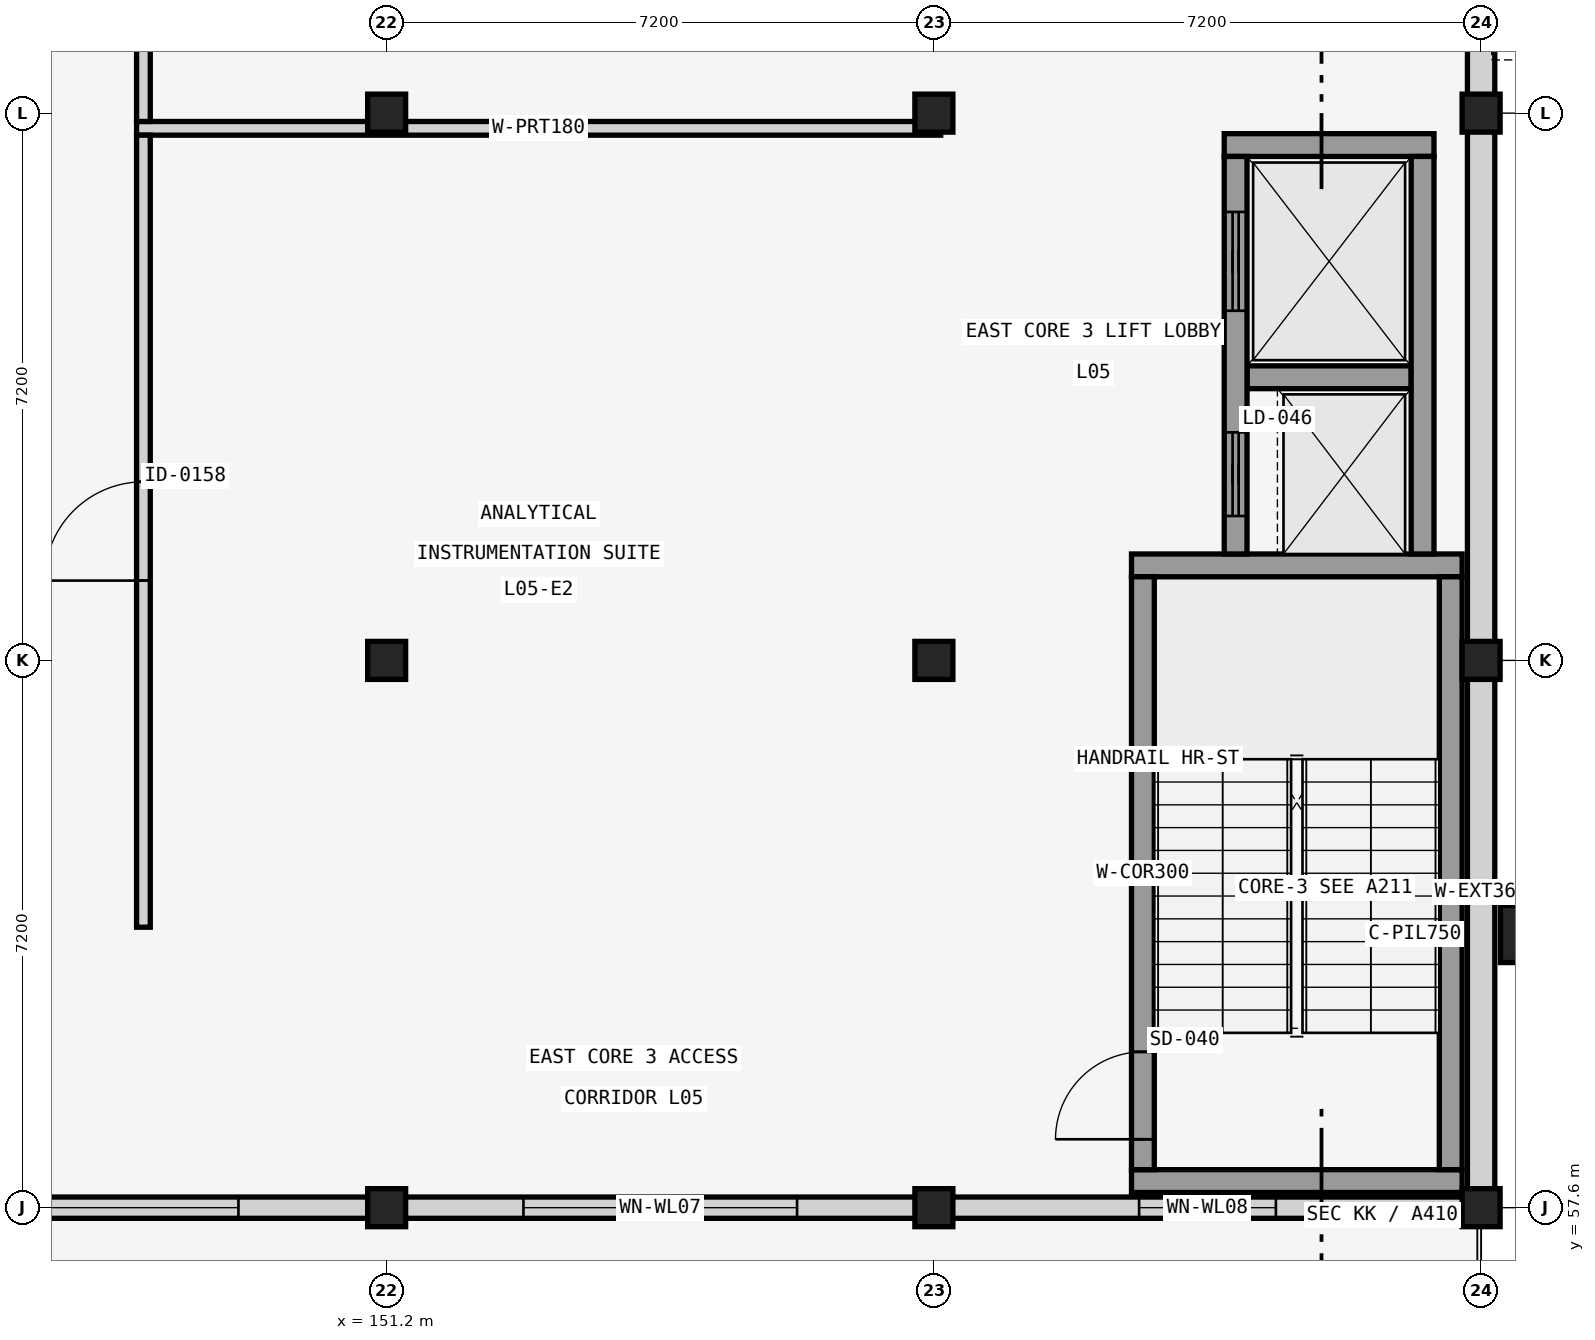
"""IFC4 building model, lengths in metres.
Left out: names, types, materials, properties, quantities, classifications, styles, units other than length and angle.
Written with IfcOpenShell. Run it as: python <this file> out.ifc"""

import sys

from ifc_helpers import new_model, si_unit, direction, frame, frame_2d, origin, origin_2d, place, context, subcontext, project, spatial, rectangle, extrude, element, fill, save


model = new_model("IFC4")
c1 = context("Model", 3, precision=1e-05, world=origin(), true_north=direction((0.0, 1.0)))
c2 = subcontext(c1, "Body", "Model", "MODEL_VIEW")
j1 = project(units=[si_unit("LENGTHUNIT", "METRE"), si_unit("PLANEANGLEUNIT", "RADIAN")], contexts=[c1])
p1 = place(None, origin())
s1 = spatial("IfcSite", under=j1, at=p1, CompositionType="ELEMENT")
p2 = place(p1, origin())
s2 = spatial("IfcBuilding", under=s1, at=p2, CompositionType="ELEMENT")
p3 = place(p2, frame((0.0, 0.0, 21.44)))
s3 = spatial("IfcBuildingStorey", under=s2, at=p3, CompositionType="ELEMENT", Elevation=21.44)
for number, where, z_axis, x_axis in (
    (1, (151.2, 57.6, 0.0), (0.0, 0.0, 1.0), (1.0, 0.0, 0.0)),
    (2, (151.2, 64.8, 0.0), (0.0, 0.0, 1.0), (1.0, 0.0, 0.0)),
    (3, (151.2, 72.0, 0.0), (0.0, 0.0, 1.0), (1.0, 0.0, 0.0)),
    (4, (158.4, 57.6, 0.0), (0.0, 0.0, 1.0), (1.0, 0.0, 0.0)),
    (5, (158.4, 64.8, 0.0), (0.0, 0.0, 1.0), (1.0, 0.0, 0.0)),
    (6, (158.4, 72.0, 0.0), (0.0, 0.0, 1.0), (1.0, 0.0, 0.0)),
    (7, (165.6, 57.6, 0.0), (0.0, 0.0, 1.0), (1.0, 0.0, 0.0)),
    (8, (165.6, 64.8, 0.0), (0.0, 0.0, 1.0), (1.0, 0.0, 0.0)),
    (9, (165.6, 72.0, 0.0), (0.0, 0.0, 1.0), (1.0, 0.0, 0.0)),
):
    element("IfcColumn", number, at=place(p3, frame(where, z_axis=z_axis, x_axis=x_axis)), inside=s3, PredefinedType="COLUMN", context=c2, shape_type="SweptSolid", body=[
        extrude(rectangle(XDim=0.5, YDim=0.5, at=origin_2d()), origin(), (0.0, 0.0, 1.0), 4.16),
    ])
p4 = place(p3, frame((166.08, 61.2, 0.0), z_axis=(0.0, 0.0, 1.0), x_axis=(1.0, 0.0, 0.0)))
e10 = element("IfcColumn", 10, at=p4, inside=s3, PredefinedType="PILASTER", context=c2, shape_type="SweptSolid", body=[
    extrude(rectangle(XDim=0.45, YDim=0.75, at=origin_2d()), origin(), (0.0, 0.0, 1.0), 4.16),
])
p5 = place(p3, frame((165.6, 57.84, 0.0), z_axis=(0.0, 0.0, 1.0), x_axis=(0.0, 1.0, 0.0)))
e11 = element("IfcWall", 11, at=p5, inside=s3, PredefinedType="SOLIDWALL", context=c2, shape_type="SweptSolid", body=[
    extrude(rectangle(XDim=6.72, YDim=0.36, at=frame_2d((3.36, 0.0))), origin(), (0.0, 0.0, 1.0), 3.21),
])
p6 = place(p3, frame((165.6, 65.04, 0.0), z_axis=(0.0, 0.0, 1.0), x_axis=(0.0, 1.0, 0.0)))
e12 = element("IfcWall", 12, at=p6, inside=s3, PredefinedType="SOLIDWALL", context=c2, shape_type="SweptSolid", body=[
    extrude(rectangle(XDim=6.72, YDim=0.36, at=frame_2d((3.36, 0.0))), origin(), (0.0, 0.0, 1.0), 3.16),
])
p7 = place(p3, frame((165.6, 72.24, 0.0), z_axis=(0.0, 0.0, 1.0), x_axis=(0.0, 1.0, 0.0)))
e13 = element("IfcWall", 13, at=p7, inside=s3, PredefinedType="SOLIDWALL", context=c2, shape_type="SweptSolid", body=[
    extrude(rectangle(XDim=6.72, YDim=0.36, at=frame_2d((3.36, 0.0))), origin(), (0.0, 0.0, 1.0), 3.16),
])
p8 = place(p7, frame((1.71, 0.0, 0.9)))
e14 = element("IfcOpeningElement", 14, at=p8, cuts=e13, PredefinedType="OPENING", context=c2, shape_type="SweptSolid", body=[
    extrude(rectangle(XDim=3.3, YDim=2.1, at=frame_2d((1.65, 1.05))), frame((0.0, 0.19, 0.0), z_axis=(0.0, -1.0, 0.0), x_axis=(1.0, 0.0, 0.0)), (0.0, 0.0, 1.0), 0.38),
])
p9 = place(p3, frame((144.24, 57.6, 0.0), z_axis=(0.0, 0.0, 1.0), x_axis=(1.0, 0.0, 0.0)))
e15 = element("IfcWall", 15, at=p9, inside=s3, PredefinedType="SOLIDWALL", context=c2, shape_type="SweptSolid", body=[
    extrude(rectangle(XDim=6.72, YDim=0.28, at=frame_2d((3.36, 0.0))), origin(), (0.0, 0.0, 1.0), 3.21),
])
p10 = place(p9, frame((1.71, 0.0, 0.95)))
e16 = element("IfcOpeningElement", 16, at=p10, cuts=e15, PredefinedType="OPENING", context=c2, shape_type="SweptSolid", body=[
    extrude(rectangle(XDim=3.3, YDim=2.1, at=frame_2d((1.65, 1.05))), frame((0.0, 0.15, 0.0), z_axis=(0.0, -1.0, 0.0), x_axis=(1.0, 0.0, 0.0)), (0.0, 0.0, 1.0), 0.3),
])
p11 = place(p3, frame((151.44, 57.6, 0.0), z_axis=(0.0, 0.0, 1.0), x_axis=(1.0, 0.0, 0.0)))
e17 = element("IfcWall", 17, at=p11, inside=s3, PredefinedType="SOLIDWALL", context=c2, shape_type="SweptSolid", body=[
    extrude(rectangle(XDim=6.72, YDim=0.28, at=frame_2d((3.36, 0.0))), origin(), (0.0, 0.0, 1.0), 3.21),
])
p12 = place(p11, frame((1.56, 0.0, 0.95)))
e18 = element("IfcOpeningElement", 18, at=p12, cuts=e17, PredefinedType="OPENING", context=c2, shape_type="SweptSolid", body=[
    extrude(rectangle(XDim=3.6, YDim=2.1, at=frame_2d((1.8, 1.05))), frame((0.0, 0.15, 0.0), z_axis=(0.0, -1.0, 0.0), x_axis=(1.0, 0.0, 0.0)), (0.0, 0.0, 1.0), 0.3),
])
p13 = place(p3, frame((158.64, 57.6, 0.0), z_axis=(0.0, 0.0, 1.0), x_axis=(1.0, 0.0, 0.0)))
e19 = element("IfcWall", 19, at=p13, inside=s3, PredefinedType="SOLIDWALL", context=c2, shape_type="SweptSolid", body=[
    extrude(rectangle(XDim=6.72, YDim=0.28, at=frame_2d((3.36, 0.0))), origin(), (0.0, 0.0, 1.0), 3.21),
])
p14 = place(p13, frame((2.46, 0.0, 0.95)))
e20 = element("IfcOpeningElement", 20, at=p14, cuts=e19, PredefinedType="OPENING", context=c2, shape_type="SweptSolid", body=[
    extrude(rectangle(XDim=1.8, YDim=1.8, at=frame_2d((0.9, 0.9))), frame((0.0, 0.15, 0.0), z_axis=(0.0, -1.0, 0.0), x_axis=(1.0, 0.0, 0.0)), (0.0, 0.0, 1.0), 0.3),
])
for number, where, z_axis, x_axis in (
    (21, (161.0, 57.95, 0.0), (0.0, 0.0, 1.0), (1.0, 0.0, 0.0)),
    (22, (161.0, 66.05, 0.0), (0.0, 0.0, 1.0), (1.0, 0.0, 0.0)),
):
    element("IfcWall", number, at=place(p3, frame(where, z_axis=z_axis, x_axis=x_axis)), inside=s3, PredefinedType="SHEAR", context=c2, shape_type="SweptSolid", body=[
        extrude(rectangle(XDim=4.35, YDim=0.3, at=frame_2d((2.175, 0.0))), origin(), (0.0, 0.0, 1.0), 3.81),
    ])
p15 = place(p3, frame((161.15, 58.1, 0.0), z_axis=(0.0, 0.0, 1.0), x_axis=(0.0, 1.0, 0.0)))
e23 = element("IfcWall", 23, at=p15, inside=s3, PredefinedType="SHEAR", context=c2, shape_type="SweptSolid", body=[
    extrude(rectangle(XDim=7.8, YDim=0.3, at=frame_2d((3.9, 0.0))), origin(), (0.0, 0.0, 1.0), 3.81),
])
p16 = place(p15, frame((0.4, 0.0, 0.0)))
e24 = element("IfcOpeningElement", 24, at=p16, cuts=e23, PredefinedType="OPENING", context=c2, shape_type="SweptSolid", body=[
    extrude(rectangle(XDim=1.15, YDim=2.2, at=frame_2d((0.575, 1.1))), frame((0.0, 0.16, 0.0), z_axis=(0.0, -1.0, 0.0), x_axis=(1.0, 0.0, 0.0)), (0.0, 0.0, 1.0), 0.32),
])
p17 = place(p3, frame((165.2, 58.1, 0.0), z_axis=(0.0, 0.0, 1.0), x_axis=(0.0, 1.0, 0.0)))
e25 = element("IfcWall", 25, at=p17, inside=s3, PredefinedType="SHEAR", context=c2, shape_type="SweptSolid", body=[
    extrude(rectangle(XDim=7.8, YDim=0.3, at=frame_2d((3.9, 0.0))), origin(), (0.0, 0.0, 1.0), 3.81),
])
p18 = place(p3, frame((162.22, 71.58, 0.0), z_axis=(0.0, 0.0, 1.0), x_axis=(1.0, 0.0, 0.0)))
e26 = element("IfcWall", 26, at=p18, inside=s3, PredefinedType="SHEAR", context=c2, shape_type="SweptSolid", body=[
    extrude(rectangle(XDim=2.76, YDim=0.3, at=frame_2d((1.38, 0.0))), origin(), (0.0, 0.0, 1.0), 3.81),
])
p19 = place(p3, frame((162.52, 68.525, 0.0), z_axis=(0.0, 0.0, 1.0), x_axis=(1.0, 0.0, 0.0)))
e27 = element("IfcWall", 27, at=p19, inside=s3, PredefinedType="SHEAR", context=c2, shape_type="SweptSolid", body=[
    extrude(rectangle(XDim=2.16, YDim=0.3, at=frame_2d((1.08, 0.0))), origin(), (0.0, 0.0, 1.0), 3.81),
])
p20 = place(p3, frame((162.37, 66.2, 0.0), z_axis=(0.0, 0.0, 1.0), x_axis=(0.0, 1.0, 0.0)))
e28 = element("IfcWall", 28, at=p20, inside=s3, PredefinedType="SHEAR", context=c2, shape_type="SweptSolid", body=[
    extrude(rectangle(XDim=5.23, YDim=0.3, at=frame_2d((2.615, 0.0))), origin(), (0.0, 0.0, 1.0), 3.81),
])
p21 = place(p20, frame((0.5, 0.0, 0.0)))
e29 = element("IfcOpeningElement", 29, at=p21, cuts=e28, PredefinedType="OPENING", context=c2, shape_type="SweptSolid", body=[
    extrude(rectangle(XDim=1.1, YDim=2.2, at=frame_2d((0.55, 1.1))), frame((0.0, 0.16, 0.0), z_axis=(0.0, -1.0, 0.0), x_axis=(1.0, 0.0, 0.0)), (0.0, 0.0, 1.0), 0.32),
])
p22 = place(p20, frame((3.2, 0.0, 0.0)))
e30 = element("IfcOpeningElement", 30, at=p22, cuts=e28, PredefinedType="OPENING", context=c2, shape_type="SweptSolid", body=[
    extrude(rectangle(XDim=1.3, YDim=2.2, at=frame_2d((0.65, 1.1))), frame((0.0, 0.16, 0.0), z_axis=(0.0, -1.0, 0.0), x_axis=(1.0, 0.0, 0.0)), (0.0, 0.0, 1.0), 0.32),
])
p23 = place(p3, frame((164.83, 66.2, 0.0), z_axis=(0.0, 0.0, 1.0), x_axis=(0.0, 1.0, 0.0)))
e31 = element("IfcWall", 31, at=p23, inside=s3, PredefinedType="SHEAR", context=c2, shape_type="SweptSolid", body=[
    extrude(rectangle(XDim=5.23, YDim=0.3, at=frame_2d((2.615, 0.0))), origin(), (0.0, 0.0, 1.0), 3.81),
])
p24 = place(p3, frame((147.91, 71.8, 0.0), z_axis=(0.0, 0.0, 1.0), x_axis=(1.0, 0.0, 0.0)))
e32 = element("IfcWall", 32, at=p24, inside=s3, PredefinedType="PARTITIONING", context=c2, shape_type="SweptSolid", body=[
    extrude(rectangle(XDim=10.58, YDim=0.18, at=frame_2d((5.29, 0.0))), origin(), (0.0, 0.0, 1.0), 3.16),
])
p25 = place(p3, frame((148.0, 61.29, 0.0), z_axis=(0.0, 0.0, 1.0), x_axis=(0.0, 1.0, 0.0)))
e33 = element("IfcWall", 33, at=p25, inside=s3, PredefinedType="PARTITIONING", context=c2, shape_type="SweptSolid", body=[
    extrude(rectangle(XDim=10.42, YDim=0.18, at=frame_2d((5.21, 0.0))), origin(), (0.0, 0.0, 1.0), 3.16),
])
p26 = place(p25, frame((4.56, 0.0, 0.0)))
e34 = element("IfcOpeningElement", 34, at=p26, cuts=e33, PredefinedType="OPENING", context=c2, shape_type="SweptSolid", body=[
    extrude(rectangle(XDim=1.3, YDim=2.15, at=frame_2d((0.65, 1.075))), frame((0.0, 0.1, 0.0), z_axis=(0.0, -1.0, 0.0), x_axis=(1.0, 0.0, 0.0)), (0.0, 0.0, 1.0), 0.2),
])
p27 = place(p3, frame((148.0, 71.89, 0.0), z_axis=(0.0, 0.0, 1.0), x_axis=(0.0, 1.0, 0.0)))
e35 = element("IfcWall", 35, at=p27, inside=s3, PredefinedType="PARTITIONING", context=c2, shape_type="SweptSolid", body=[
    extrude(rectangle(XDim=28.82, YDim=0.18, at=frame_2d((14.41, 0.0))), origin(), (0.0, 0.0, 1.0), 3.16),
])
p28 = place(p27, frame((13.685, 0.0, 0.0)))
e36 = element("IfcOpeningElement", 36, at=p28, cuts=e35, PredefinedType="OPENING", context=c2, shape_type="SweptSolid", body=[
    extrude(rectangle(XDim=1.45, YDim=2.2, at=frame_2d((0.725, 1.1))), frame((0.0, 0.1, 0.0), z_axis=(0.0, -1.0, 0.0), x_axis=(1.0, 0.0, 0.0)), (0.0, 0.0, 1.0), 0.2),
])
p29 = place(p10, origin())
e37 = element("IfcWindow", 37, at=p29, inside=s3, PartitioningType="SINGLE_PANEL", PredefinedType="WINDOW", context=c2, shape_type="SweptSolid", body=[
    extrude(rectangle(XDim=3.3, YDim=2.1, at=frame_2d((1.65, 1.05))), frame((0.0, 0.03, 0.0), z_axis=(0.0, -1.0, 0.0), x_axis=(1.0, 0.0, 0.0)), (0.0, 0.0, 1.0), 0.06),
])
fill(e16, e37)
p30 = place(p12, origin())
e38 = element("IfcWindow", 38, at=p30, inside=s3, PartitioningType="SINGLE_PANEL", PredefinedType="WINDOW", context=c2, shape_type="SweptSolid", body=[
    extrude(rectangle(XDim=3.6, YDim=2.1, at=frame_2d((1.8, 1.05))), frame((0.0, 0.03, 0.0), z_axis=(0.0, -1.0, 0.0), x_axis=(1.0, 0.0, 0.0)), (0.0, 0.0, 1.0), 0.06),
])
fill(e18, e38)
p31 = place(p14, origin())
e39 = element("IfcWindow", 39, at=p31, inside=s3, PartitioningType="SINGLE_PANEL", PredefinedType="WINDOW", context=c2, shape_type="SweptSolid", body=[
    extrude(rectangle(XDim=1.8, YDim=1.8, at=frame_2d((0.9, 0.9))), frame((0.0, 0.03, 0.0), z_axis=(0.0, -1.0, 0.0), x_axis=(1.0, 0.0, 0.0)), (0.0, 0.0, 1.0), 0.06),
])
fill(e20, e39)
p32 = place(p16, frame((1.15, 0.0, 0.0), z_axis=(0.0, 0.0, 1.0), x_axis=(-1.0, 0.0, 0.0)))
e40 = element("IfcDoor", 40, at=p32, inside=s3, OperationType="SINGLE_SWING_LEFT", PredefinedType="DOOR", context=c2, shape_type="SweptSolid", body=[
    extrude(rectangle(XDim=1.15, YDim=2.2, at=frame_2d((0.575, 1.1))), frame((0.0, 0.025, 0.0), z_axis=(0.0, -1.0, 0.0), x_axis=(1.0, 0.0, 0.0)), (0.0, 0.0, 1.0), 0.05),
])
fill(e24, e40)
p33 = place(p21, origin())
e41 = element("IfcDoor", 41, at=p33, inside=s3, OperationType="SLIDING_TO_LEFT", PredefinedType="DOOR", context=c2, shape_type="SweptSolid", body=[
    extrude(rectangle(XDim=1.1, YDim=2.2, at=frame_2d((0.55, 1.1))), frame((0.0, 0.025, 0.0), z_axis=(0.0, -1.0, 0.0), x_axis=(1.0, 0.0, 0.0)), (0.0, 0.0, 1.0), 0.05),
])
fill(e29, e41)
p34 = place(p22, origin())
e42 = element("IfcDoor", 42, at=p34, inside=s3, OperationType="SLIDING_TO_LEFT", PredefinedType="DOOR", context=c2, shape_type="SweptSolid", body=[
    extrude(rectangle(XDim=1.3, YDim=2.2, at=frame_2d((0.65, 1.1))), frame((0.0, 0.025, 0.0), z_axis=(0.0, -1.0, 0.0), x_axis=(1.0, 0.0, 0.0)), (0.0, 0.0, 1.0), 0.05),
])
fill(e30, e42)
p35 = place(p26, origin())
e43 = element("IfcDoor", 43, at=p35, inside=s3, OperationType="SINGLE_SWING_LEFT", PredefinedType="DOOR", context=c2, shape_type="SweptSolid", body=[
    extrude(rectangle(XDim=1.3, YDim=2.15, at=frame_2d((0.65, 1.075))), frame((0.0, 0.025, 0.0), z_axis=(0.0, -1.0, 0.0), x_axis=(1.0, 0.0, 0.0)), (0.0, 0.0, 1.0), 0.05),
])
fill(e34, e43)
save(model, sys.argv[1])
